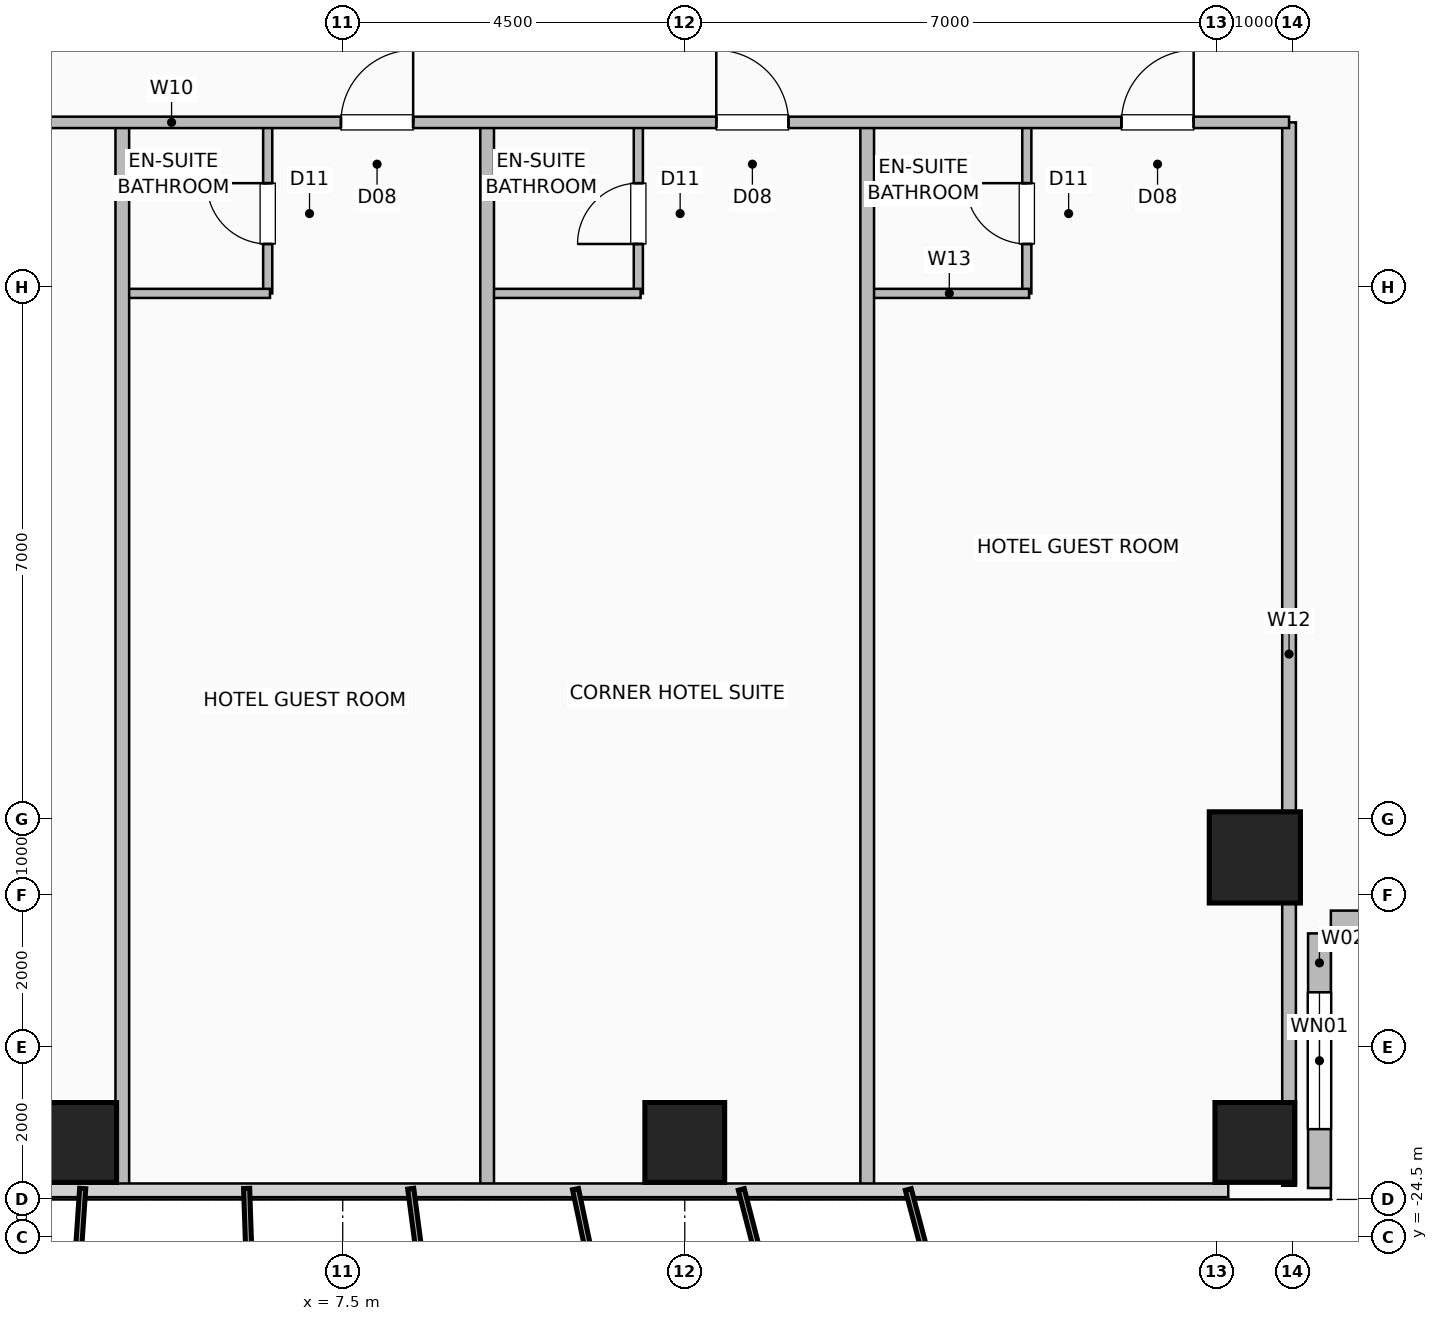
"""IFC4 building model, lengths in metres.
Left out: names, types, materials, properties, quantities, classifications, styles, units other than length and angle.
Written with IfcOpenShell. Run it as: python <this file> out.ifc"""

import sys

from ifc_helpers import new_model, si_unit, direction, frame, frame_2d, origin, origin_2d, place, context, subcontext, project, spatial, rectangle, hollow_rectangle, extrude, element, fill, save


model = new_model("IFC4")
c1 = context("Model", 3, precision=1e-05, world=origin(), true_north=direction((0.0, 1.0)))
c2 = subcontext(c1, "Body", "Model", "MODEL_VIEW")
j1 = project(units=[si_unit("LENGTHUNIT", "METRE"), si_unit("PLANEANGLEUNIT", "RADIAN")], contexts=[c1])
p1 = place(None, origin())
s1 = spatial("IfcSite", under=j1, at=p1, CompositionType="ELEMENT")
p2 = place(p1, origin())
s2 = spatial("IfcBuilding", under=s1, at=p2, CompositionType="ELEMENT")
p3 = place(p2, frame((0.0, 0.0, 58.5)))
s3 = spatial("IfcBuildingStorey", under=s2, at=p3, CompositionType="ELEMENT", Elevation=58.5)
for number, where, z_axis, x_axis in (
    (1, (4.0, -23.25, 0.0), (0.0, 0.0, 1.0), (1.0, 0.0, 0.0)),
    (2, (12.0, -23.25, 0.0), (0.0, 0.0, 1.0), (1.0, 0.0, 0.0)),
    (3, (19.5, -23.25, 0.0), (0.0, 0.0, 1.0), (1.0, 0.0, 0.0)),
):
    element("IfcColumn", number, at=place(p3, frame(where, z_axis=z_axis, x_axis=x_axis)), inside=s3, PredefinedType="COLUMN", context=c2, shape_type="SweptSolid", body=[
        extrude(hollow_rectangle(XDim=1.05, YDim=1.05, WallThickness=0.05, at=origin_2d()), origin(), (0.0, 0.0, 1.0), 3.5),
    ])
p4 = place(p3, frame((19.5, -19.5, 0.0), z_axis=(0.0, 0.0, 1.0), x_axis=(1.0, 0.0, 0.0)))
e4 = element("IfcColumn", 4, at=p4, inside=s3, PredefinedType="COLUMN", context=c2, shape_type="SweptSolid", body=[
    extrude(hollow_rectangle(XDim=1.2, YDim=1.2, WallThickness=0.055, at=origin_2d()), origin(), (0.0, 0.0, 1.0), 3.5),
])
p5 = place(p3, frame((20.35, -23.85, 0.0), z_axis=(0.0, 0.0, 1.0), x_axis=(0.0, 1.0, 0.0)))
e5 = element("IfcWall", 5, at=p5, inside=s3, PredefinedType="SOLIDWALL", context=c2, shape_type="SweptSolid", body=[
    extrude(rectangle(XDim=3.35, YDim=0.3, at=frame_2d((1.675, 0.0))), origin(), (0.0, 0.0, 1.0), 3.25),
])
p6 = place(p5, frame((0.775, 0.0, 0.9)))
e6 = element("IfcOpeningElement", 6, at=p6, cuts=e5, PredefinedType="OPENING", context=c2, shape_type="SweptSolid", body=[
    extrude(rectangle(XDim=1.8, YDim=1.8, at=frame_2d((0.9, 0.9))), frame((0.0, 0.16, 0.0), z_axis=(0.0, -1.0, 0.0), x_axis=(1.0, 0.0, 0.0)), (0.0, 0.0, 1.0), 0.32),
])
p7 = place(p3, frame((23.85, -20.35, 0.0), z_axis=(0.0, 0.0, 1.0), x_axis=(-1.0, 0.0, 0.0)))
e7 = element("IfcWall", 7, at=p7, inside=s3, PredefinedType="SOLIDWALL", context=c2, shape_type="SweptSolid", body=[
    extrude(rectangle(XDim=3.35, YDim=0.3, at=frame_2d((1.675, 0.0))), origin(), (0.0, 0.0, 1.0), 3.25),
])
p8 = place(p3, frame((6.513, -12.08, 0.0), z_axis=(0.0, 0.0, 1.0), x_axis=(0.0, 1.0, 0.0)))
e8 = element("IfcWall", 8, at=p8, inside=s3, PredefinedType="PLUMBINGWALL", context=c2, shape_type="SweptSolid", body=[
    extrude(rectangle(XDim=2.25, YDim=0.12, at=frame_2d((1.125, 0.0))), origin(), (0.0, 0.0, 1.0), 3.25),
])
p9 = place(p8, frame((0.65, 0.0, 0.0)))
e9 = element("IfcOpeningElement", 9, at=p9, cuts=e8, PredefinedType="OPENING", context=c2, shape_type="SweptSolid", body=[
    extrude(rectangle(XDim=0.8, YDim=2.05, at=frame_2d((0.4, 1.025))), frame((0.0, 0.07, 0.0), z_axis=(0.0, -1.0, 0.0), x_axis=(1.0, 0.0, 0.0)), (0.0, 0.0, 1.0), 0.14),
])
p10 = place(p3, frame((4.63, -12.08, 0.0), z_axis=(0.0, 0.0, 1.0), x_axis=(1.0, 0.0, 0.0)))
e10 = element("IfcWall", 10, at=p10, inside=s3, PredefinedType="PLUMBINGWALL", context=c2, shape_type="SweptSolid", body=[
    extrude(rectangle(XDim=1.913, YDim=0.12, at=frame_2d((0.957, 0.0))), origin(), (0.0, 0.0, 1.0), 3.25),
])
p11 = place(p3, frame((11.389, -12.08, 0.0), z_axis=(0.0, 0.0, 1.0), x_axis=(0.0, 1.0, 0.0)))
e11 = element("IfcWall", 11, at=p11, inside=s3, PredefinedType="PLUMBINGWALL", context=c2, shape_type="SweptSolid", body=[
    extrude(rectangle(XDim=2.25, YDim=0.12, at=frame_2d((1.125, 0.0))), origin(), (0.0, 0.0, 1.0), 3.25),
])
p12 = place(p11, frame((0.65, 0.0, 0.0)))
e12 = element("IfcOpeningElement", 12, at=p12, cuts=e11, PredefinedType="OPENING", context=c2, shape_type="SweptSolid", body=[
    extrude(rectangle(XDim=0.8, YDim=2.05, at=frame_2d((0.4, 1.025))), frame((0.0, 0.07, 0.0), z_axis=(0.0, -1.0, 0.0), x_axis=(1.0, 0.0, 0.0)), (0.0, 0.0, 1.0), 0.14),
])
p13 = place(p3, frame((9.43, -12.08, 0.0), z_axis=(0.0, 0.0, 1.0), x_axis=(1.0, 0.0, 0.0)))
e13 = element("IfcWall", 13, at=p13, inside=s3, PredefinedType="PLUMBINGWALL", context=c2, shape_type="SweptSolid", body=[
    extrude(rectangle(XDim=1.989, YDim=0.12, at=frame_2d((0.995, 0.0))), origin(), (0.0, 0.0, 1.0), 3.25),
])
p14 = place(p3, frame((16.5, -12.08, 0.0), z_axis=(0.0, 0.0, 1.0), x_axis=(0.0, 1.0, 0.0)))
e14 = element("IfcWall", 14, at=p14, inside=s3, PredefinedType="PLUMBINGWALL", context=c2, shape_type="SweptSolid", body=[
    extrude(rectangle(XDim=2.25, YDim=0.12, at=frame_2d((1.125, 0.0))), origin(), (0.0, 0.0, 1.0), 3.25),
])
p15 = place(p14, frame((0.65, 0.0, 0.0)))
e15 = element("IfcOpeningElement", 15, at=p15, cuts=e14, PredefinedType="OPENING", context=c2, shape_type="SweptSolid", body=[
    extrude(rectangle(XDim=0.8, YDim=2.05, at=frame_2d((0.4, 1.025))), frame((0.0, 0.07, 0.0), z_axis=(0.0, -1.0, 0.0), x_axis=(1.0, 0.0, 0.0)), (0.0, 0.0, 1.0), 0.14),
])
p16 = place(p3, frame((14.43, -12.08, 0.0), z_axis=(0.0, 0.0, 1.0), x_axis=(1.0, 0.0, 0.0)))
e16 = element("IfcWall", 16, at=p16, inside=s3, PredefinedType="PLUMBINGWALL", context=c2, shape_type="SweptSolid", body=[
    extrude(rectangle(XDim=2.1, YDim=0.12, at=frame_2d((1.05, 0.0))), origin(), (0.0, 0.0, 1.0), 3.25),
])
for number, where, z_axis, x_axis in (
    (17, (4.6, -23.82, 0.0), (0.0, 0.0, 1.0), (0.0, 1.0, 0.0)),
    (18, (9.4, -23.82, 0.0), (0.0, 0.0, 1.0), (0.0, 1.0, 0.0)),
    (19, (14.4, -23.82, 0.0), (0.0, 0.0, 1.0), (0.0, 1.0, 0.0)),
    (20, (19.95, -23.82, 0.0), (0.0, 0.0, 1.0), (0.0, 1.0, 0.0)),
):
    element("IfcWall", number, at=place(p3, frame(where, z_axis=z_axis, x_axis=x_axis)), inside=s3, PredefinedType="PARTITIONING", context=c2, shape_type="SweptSolid", body=[
        extrude(rectangle(XDim=13.99, YDim=0.18, at=frame_2d((6.995, 0.0))), origin(), (0.0, 0.0, 1.0), 3.25),
    ])
p17 = place(p3, frame((-19.95, -9.83, 0.0), z_axis=(0.0, 0.0, 1.0), x_axis=(1.0, 0.0, 0.0)))
e21 = element("IfcWall", 21, at=p17, inside=s3, PredefinedType="PARTITIONING", context=c2, shape_type="SweptSolid", body=[
    extrude(rectangle(XDim=39.9, YDim=0.15, at=frame_2d((19.95, 0.0))), origin(), (0.0, 0.0, 1.0), 3.25),
])
p18 = place(p17, frame((3.245, 0.0, 0.0)))
e22 = element("IfcOpeningElement", 22, at=p18, cuts=e21, PredefinedType="OPENING", context=c2, shape_type="SweptSolid", body=[
    extrude(rectangle(XDim=0.95, YDim=2.08, at=frame_2d((0.475, 1.04))), frame((0.0, 0.085, 0.0), z_axis=(0.0, -1.0, 0.0), x_axis=(1.0, 0.0, 0.0)), (0.0, 0.0, 1.0), 0.17),
])
p19 = place(p17, frame((8.227, 0.0, 0.0)))
e23 = element("IfcOpeningElement", 23, at=p19, cuts=e21, PredefinedType="OPENING", context=c2, shape_type="SweptSolid", body=[
    extrude(rectangle(XDim=0.95, YDim=2.08, at=frame_2d((0.475, 1.04))), frame((0.0, 0.085, 0.0), z_axis=(0.0, -1.0, 0.0), x_axis=(1.0, 0.0, 0.0)), (0.0, 0.0, 1.0), 0.17),
])
p20 = place(p17, frame((13.027, 0.0, 0.0)))
e24 = element("IfcOpeningElement", 24, at=p20, cuts=e21, PredefinedType="OPENING", context=c2, shape_type="SweptSolid", body=[
    extrude(rectangle(XDim=0.95, YDim=2.08, at=frame_2d((0.475, 1.04))), frame((0.0, 0.085, 0.0), z_axis=(0.0, -1.0, 0.0), x_axis=(1.0, 0.0, 0.0)), (0.0, 0.0, 1.0), 0.17),
])
p21 = place(p17, frame((16.861, 0.0, 0.0)))
e25 = element("IfcOpeningElement", 25, at=p21, cuts=e21, PredefinedType="OPENING", context=c2, shape_type="SweptSolid", body=[
    extrude(rectangle(XDim=0.95, YDim=2.08, at=frame_2d((0.475, 1.04))), frame((0.0, 0.085, 0.0), z_axis=(0.0, -1.0, 0.0), x_axis=(1.0, 0.0, 0.0)), (0.0, 0.0, 1.0), 0.17),
])
p22 = place(p17, frame((22.02, 0.0, 0.0)))
e26 = element("IfcOpeningElement", 26, at=p22, cuts=e21, PredefinedType="OPENING", context=c2, shape_type="SweptSolid", body=[
    extrude(rectangle(XDim=0.95, YDim=2.08, at=frame_2d((0.475, 1.04))), frame((0.0, 0.085, 0.0), z_axis=(0.0, -1.0, 0.0), x_axis=(1.0, 0.0, 0.0)), (0.0, 0.0, 1.0), 0.17),
])
p23 = place(p17, frame((27.427, 0.0, 0.0)))
e27 = element("IfcOpeningElement", 27, at=p23, cuts=e21, PredefinedType="OPENING", context=c2, shape_type="SweptSolid", body=[
    extrude(rectangle(XDim=0.95, YDim=2.08, at=frame_2d((0.475, 1.04))), frame((0.0, 0.085, 0.0), z_axis=(0.0, -1.0, 0.0), x_axis=(1.0, 0.0, 0.0)), (0.0, 0.0, 1.0), 0.17),
])
p24 = place(p17, frame((32.365, 0.0, 0.0)))
e28 = element("IfcOpeningElement", 28, at=p24, cuts=e21, PredefinedType="OPENING", context=c2, shape_type="SweptSolid", body=[
    extrude(rectangle(XDim=0.95, YDim=2.08, at=frame_2d((0.475, 1.04))), frame((0.0, 0.085, 0.0), z_axis=(0.0, -1.0, 0.0), x_axis=(1.0, 0.0, 0.0)), (0.0, 0.0, 1.0), 0.17),
])
p25 = place(p17, frame((37.695, 0.0, 0.0)))
e29 = element("IfcOpeningElement", 29, at=p25, cuts=e21, PredefinedType="OPENING", context=c2, shape_type="SweptSolid", body=[
    extrude(rectangle(XDim=0.95, YDim=2.08, at=frame_2d((0.475, 1.04))), frame((0.0, 0.085, 0.0), z_axis=(0.0, -1.0, 0.0), x_axis=(1.0, 0.0, 0.0)), (0.0, 0.0, 1.0), 0.17),
])
p26 = place(p6, origin())
e30 = element("IfcWindow", 30, at=p26, inside=s3, PartitioningType="SINGLE_PANEL", PredefinedType="WINDOW", context=c2, shape_type="SweptSolid", body=[
    extrude(rectangle(XDim=1.8, YDim=1.8, at=frame_2d((0.9, 0.9))), frame((0.0, 0.03, 0.0), z_axis=(0.0, -1.0, 0.0), x_axis=(1.0, 0.0, 0.0)), (0.0, 0.0, 1.0), 0.06),
])
fill(e6, e30)
p27 = place(p9, origin())
e31 = element("IfcDoor", 31, at=p27, inside=s3, OperationType="SINGLE_SWING_RIGHT", PredefinedType="DOOR", context=c2, shape_type="SweptSolid", body=[
    extrude(rectangle(XDim=0.8, YDim=2.05, at=frame_2d((0.4, 1.025))), frame((0.0, 0.025, 0.0), z_axis=(0.0, -1.0, 0.0), x_axis=(1.0, 0.0, 0.0)), (0.0, 0.0, 1.0), 0.05),
])
fill(e9, e31)
p28 = place(p12, origin())
e32 = element("IfcDoor", 32, at=p28, inside=s3, OperationType="SINGLE_SWING_LEFT", PredefinedType="DOOR", context=c2, shape_type="SweptSolid", body=[
    extrude(rectangle(XDim=0.8, YDim=2.05, at=frame_2d((0.4, 1.025))), frame((0.0, 0.025, 0.0), z_axis=(0.0, -1.0, 0.0), x_axis=(1.0, 0.0, 0.0)), (0.0, 0.0, 1.0), 0.05),
])
fill(e12, e32)
p29 = place(p15, origin())
e33 = element("IfcDoor", 33, at=p29, inside=s3, OperationType="SINGLE_SWING_RIGHT", PredefinedType="DOOR", context=c2, shape_type="SweptSolid", body=[
    extrude(rectangle(XDim=0.8, YDim=2.05, at=frame_2d((0.4, 1.025))), frame((0.0, 0.025, 0.0), z_axis=(0.0, -1.0, 0.0), x_axis=(1.0, 0.0, 0.0)), (0.0, 0.0, 1.0), 0.05),
])
fill(e15, e33)
p30 = place(p23, origin())
e34 = element("IfcDoor", 34, at=p30, inside=s3, OperationType="SINGLE_SWING_RIGHT", PredefinedType="DOOR", context=c2, shape_type="SweptSolid", body=[
    extrude(rectangle(XDim=0.95, YDim=2.08, at=frame_2d((0.475, 1.04))), frame((0.0, 0.025, 0.0), z_axis=(0.0, -1.0, 0.0), x_axis=(1.0, 0.0, 0.0)), (0.0, 0.0, 1.0), 0.05),
])
fill(e27, e34)
p31 = place(p24, origin())
e35 = element("IfcDoor", 35, at=p31, inside=s3, OperationType="SINGLE_SWING_LEFT", PredefinedType="DOOR", context=c2, shape_type="SweptSolid", body=[
    extrude(rectangle(XDim=0.95, YDim=2.08, at=frame_2d((0.475, 1.04))), frame((0.0, 0.025, 0.0), z_axis=(0.0, -1.0, 0.0), x_axis=(1.0, 0.0, 0.0)), (0.0, 0.0, 1.0), 0.05),
])
fill(e28, e35)
p32 = place(p25, origin())
e36 = element("IfcDoor", 36, at=p32, inside=s3, OperationType="SINGLE_SWING_RIGHT", PredefinedType="DOOR", context=c2, shape_type="SweptSolid", body=[
    extrude(rectangle(XDim=0.95, YDim=2.08, at=frame_2d((0.475, 1.04))), frame((0.0, 0.025, 0.0), z_axis=(0.0, -1.0, 0.0), x_axis=(1.0, 0.0, 0.0)), (0.0, 0.0, 1.0), 0.05),
])
fill(e29, e36)
save(model, sys.argv[1])
